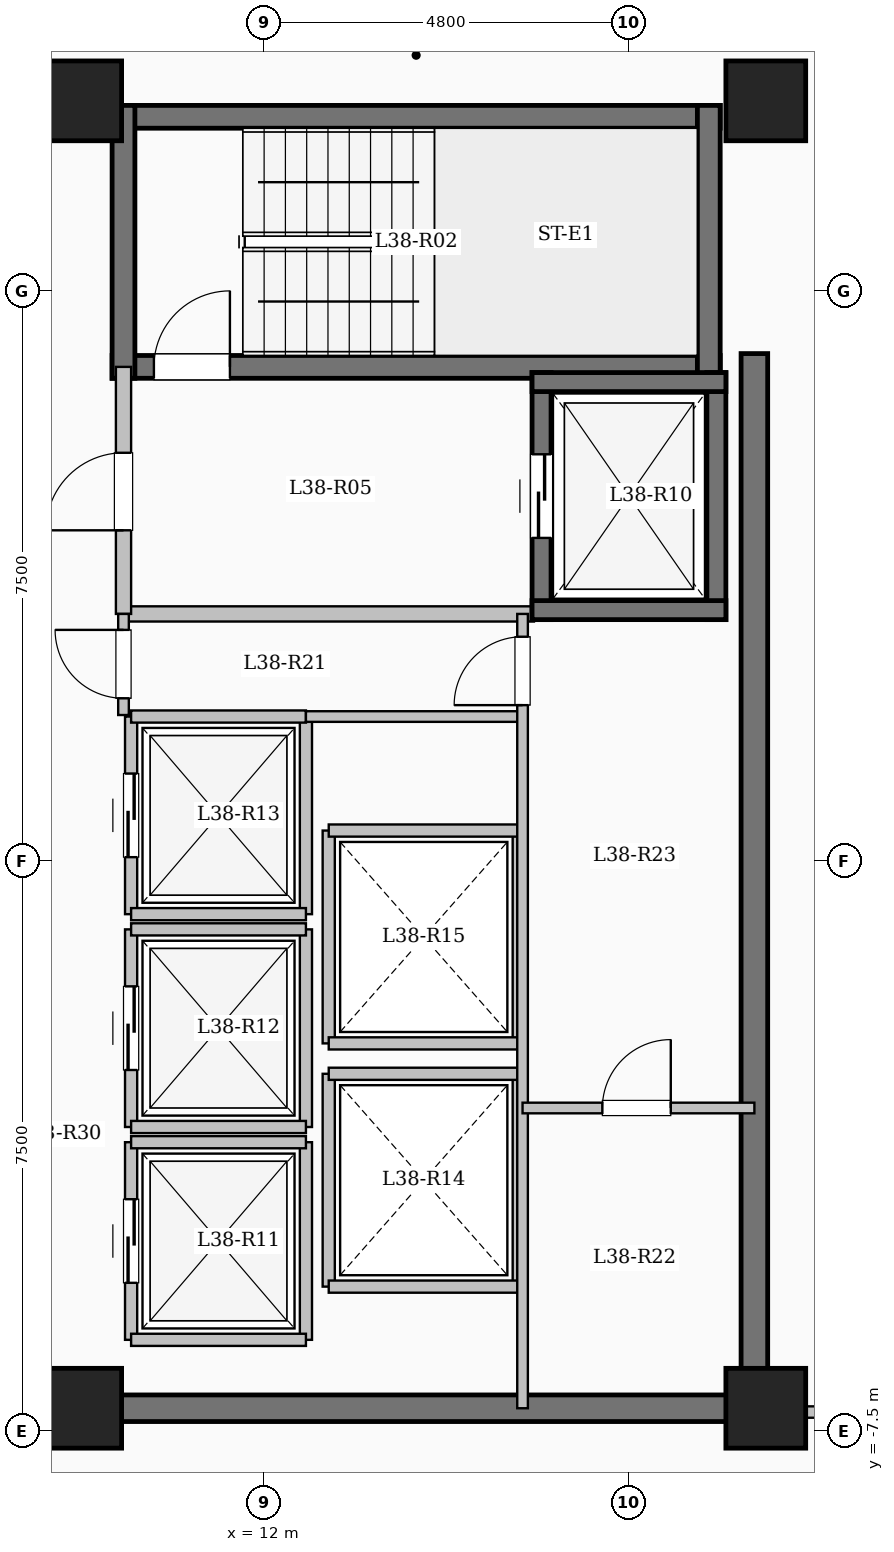
"""IFC4 building model, lengths in metres.
Left out: names, types, materials, properties, quantities, classifications, styles, units other than length and angle.
Written with IfcOpenShell. Run it as: python <this file> out.ifc"""

import sys

from ifc_helpers import new_model, si_unit, direction, frame, frame_2d, origin, origin_2d, place, context, subcontext, project, spatial, rectangle, extrude, element, fill, save


model = new_model("IFC4")
c1 = context("Model", 3, precision=1e-05, world=origin(), true_north=direction((0.0, 1.0)))
c2 = subcontext(c1, "Body", "Model", "MODEL_VIEW")
j1 = project(units=[si_unit("LENGTHUNIT", "METRE"), si_unit("PLANEANGLEUNIT", "RADIAN")], contexts=[c1])
p1 = place(None, origin())
s1 = spatial("IfcSite", under=j1, at=p1, CompositionType="ELEMENT")
p2 = place(p1, origin())
s2 = spatial("IfcBuilding", under=s1, at=p2, CompositionType="ELEMENT")
p3 = place(p2, frame((0.0, 0.0, 142.65)))
s3 = spatial("IfcBuildingStorey", under=s2, at=p3, CompositionType="ELEMENT", Elevation=142.65)
for number, where, z_axis, x_axis in (
    (1, (9.6, -7.2, 0.0), (0.0, 0.0, 1.0), (1.0, 0.0, 0.0)),
    (2, (9.6, 10.0, 0.0), (0.0, 0.0, 1.0), (1.0, 0.0, 0.0)),
    (3, (18.6, -7.2, 0.0), (0.0, 0.0, 1.0), (1.0, 0.0, 0.0)),
    (4, (18.6, 10.0, 0.0), (0.0, 0.0, 1.0), (1.0, 0.0, 0.0)),
):
    element("IfcColumn", number, at=place(p3, frame(where, z_axis=z_axis, x_axis=x_axis)), inside=s3, PredefinedType="COLUMN", context=c2, shape_type="SweptSolid", body=[
        extrude(rectangle(XDim=1.05, YDim=1.05, at=origin_2d()), origin(), (0.0, 0.0, 1.0), 3.35),
    ])
p4 = place(p3, frame((10.0, 9.79, 0.0), z_axis=(0.0, 0.0, 1.0), x_axis=(1.0, 0.0, 0.0)))
e5 = element("IfcWall", 5, at=p4, inside=s3, PredefinedType="SHEAR", context=c2, shape_type="SweptSolid", body=[
    extrude(rectangle(XDim=8.0, YDim=0.3, at=frame_2d((4.0, 0.0))), origin(), (0.0, 0.0, 1.0), 3.35),
])
p5 = place(p3, frame((10.0, 6.5, 0.0), z_axis=(0.0, 0.0, 1.0), x_axis=(1.0, 0.0, 0.0)))
e6 = element("IfcWall", 6, at=p5, inside=s3, PredefinedType="SHEAR", context=c2, shape_type="SweptSolid", body=[
    extrude(rectangle(XDim=8.0, YDim=0.3, at=frame_2d((4.0, 0.0))), origin(), (0.0, 0.0, 1.0), 3.35),
])
p6 = place(p5, frame((0.55, 0.0, 0.0)))
e7 = element("IfcOpeningElement", 7, at=p6, cuts=e6, PredefinedType="OPENING", context=c2, shape_type="SweptSolid", body=[
    extrude(rectangle(XDim=1.0, YDim=2.15, at=frame_2d((0.5, 1.075))), frame((0.0, 0.16, 0.0), z_axis=(0.0, -1.0, 0.0), x_axis=(1.0, 0.0, 0.0)), (0.0, 0.0, 1.0), 0.32),
])
for number, where, z_axis, x_axis in (
    (8, (10.15, 6.35, 0.0), (0.0, 0.0, 1.0), (0.0, 1.0, 0.0)),
    (9, (17.85, 6.35, 0.0), (0.0, 0.0, 1.0), (0.0, 1.0, 0.0)),
):
    element("IfcWall", number, at=place(p3, frame(where, z_axis=z_axis, x_axis=x_axis)), inside=s3, PredefinedType="SHEAR", context=c2, shape_type="SweptSolid", body=[
        extrude(rectangle(XDim=3.59, YDim=0.3, at=frame_2d((1.795, 0.0))), origin(), (0.0, 0.0, 1.0), 3.35),
    ])
p7 = place(p3, frame((10.15, 3.25, 0.0), z_axis=(0.0, 0.0, 1.0), x_axis=(1.0, 0.0, 0.0)))
e10 = element("IfcWall", 10, at=p7, inside=s3, PredefinedType="SOLIDWALL", context=c2, shape_type="SweptSolid", body=[
    extrude(rectangle(XDim=5.4, YDim=0.2, at=frame_2d((2.7, 0.0))), origin(), (0.0, 0.0, 1.0), 3.1),
])
p8 = place(p3, frame((10.15, 3.25, 0.0), z_axis=(0.0, 0.0, 1.0), x_axis=(0.0, 1.0, 0.0)))
e11 = element("IfcWall", 11, at=p8, inside=s3, PredefinedType="SOLIDWALL", context=c2, shape_type="SweptSolid", body=[
    extrude(rectangle(XDim=3.25, YDim=0.2, at=frame_2d((1.625, 0.0))), origin(), (0.0, 0.0, 1.0), 3.1),
])
p9 = place(p8, frame((1.1, 0.0, 0.0)))
e12 = element("IfcOpeningElement", 12, at=p9, cuts=e11, PredefinedType="OPENING", context=c2, shape_type="SweptSolid", body=[
    extrude(rectangle(XDim=1.02, YDim=2.15, at=frame_2d((0.51, 1.075))), frame((0.0, 0.11, 0.0), z_axis=(0.0, -1.0, 0.0), x_axis=(1.0, 0.0, 0.0)), (0.0, 0.0, 1.0), 0.22),
])
p10 = place(p3, frame((15.65, 3.175, 0.0), z_axis=(0.0, 0.0, 1.0), x_axis=(0.0, 1.0, 0.0)))
e13 = element("IfcWall", 13, at=p10, inside=s3, PredefinedType="SHEAR", context=c2, shape_type="SweptSolid", body=[
    extrude(rectangle(XDim=3.25, YDim=0.25, at=frame_2d((1.625, 0.0))), origin(), (0.0, 0.0, 1.0), 3.35),
])
p11 = place(p10, frame((1.075, 0.0, 0.0)))
e14 = element("IfcOpeningElement", 14, at=p11, cuts=e13, PredefinedType="OPENING", context=c2, shape_type="SweptSolid", body=[
    extrude(rectangle(XDim=1.1, YDim=2.15, at=frame_2d((0.55, 1.075))), frame((0.0, 0.135, 0.0), z_axis=(0.0, -1.0, 0.0), x_axis=(1.0, 0.0, 0.0)), (0.0, 0.0, 1.0), 0.27),
])
p12 = place(p3, frame((17.95, 3.175, 0.0), z_axis=(0.0, 0.0, 1.0), x_axis=(0.0, 1.0, 0.0)))
e15 = element("IfcWall", 15, at=p12, inside=s3, PredefinedType="SHEAR", context=c2, shape_type="SweptSolid", body=[
    extrude(rectangle(XDim=3.25, YDim=0.25, at=frame_2d((1.625, 0.0))), origin(), (0.0, 0.0, 1.0), 3.35),
])
for number, where, z_axis, x_axis in (
    (16, (15.525, 3.3, 0.0), (0.0, 0.0, 1.0), (1.0, 0.0, 0.0)),
    (17, (15.525, 6.3, 0.0), (0.0, 0.0, 1.0), (1.0, 0.0, 0.0)),
):
    element("IfcWall", number, at=place(p3, frame(where, z_axis=z_axis, x_axis=x_axis)), inside=s3, PredefinedType="SHEAR", context=c2, shape_type="SweptSolid", body=[
        extrude(rectangle(XDim=2.55, YDim=0.25, at=frame_2d((1.275, 0.0))), origin(), (0.0, 0.0, 1.0), 3.35),
    ])
p13 = place(p3, frame((10.25, -6.3, 0.0), z_axis=(0.0, 0.0, 1.0), x_axis=(0.0, 1.0, 0.0)))
e18 = element("IfcWall", 18, at=p13, inside=s3, PredefinedType="SOLIDWALL", context=c2, shape_type="SweptSolid", body=[
    extrude(rectangle(XDim=2.6, YDim=0.16, at=frame_2d((1.3, 0.0))), origin(), (0.0, 0.0, 1.0), 3.1),
])
p14 = place(p13, frame((0.75, 0.0, 0.0)))
e19 = element("IfcOpeningElement", 19, at=p14, cuts=e18, PredefinedType="OPENING", context=c2, shape_type="SweptSolid", body=[
    extrude(rectangle(XDim=1.1, YDim=2.15, at=frame_2d((0.55, 1.075))), frame((0.0, 0.09, 0.0), z_axis=(0.0, -1.0, 0.0), x_axis=(1.0, 0.0, 0.0)), (0.0, 0.0, 1.0), 0.18),
])
p15 = place(p3, frame((12.55, -6.3, 0.0), z_axis=(0.0, 0.0, 1.0), x_axis=(0.0, 1.0, 0.0)))
e20 = element("IfcWall", 20, at=p15, inside=s3, PredefinedType="SOLIDWALL", context=c2, shape_type="SweptSolid", body=[
    extrude(rectangle(XDim=2.6, YDim=0.16, at=frame_2d((1.3, 0.0))), origin(), (0.0, 0.0, 1.0), 3.1),
])
for number, where, z_axis, x_axis in (
    (21, (10.25, -6.3, 0.0), (0.0, 0.0, 1.0), (1.0, 0.0, 0.0)),
    (22, (10.25, -3.7, 0.0), (0.0, 0.0, 1.0), (1.0, 0.0, 0.0)),
):
    element("IfcWall", number, at=place(p3, frame(where, z_axis=z_axis, x_axis=x_axis)), inside=s3, PredefinedType="SOLIDWALL", context=c2, shape_type="SweptSolid", body=[
        extrude(rectangle(XDim=2.3, YDim=0.16, at=frame_2d((1.15, 0.0))), origin(), (0.0, 0.0, 1.0), 3.1),
    ])
p16 = place(p3, frame((10.25, -3.5, 0.0), z_axis=(0.0, 0.0, 1.0), x_axis=(0.0, 1.0, 0.0)))
e23 = element("IfcWall", 23, at=p16, inside=s3, PredefinedType="SOLIDWALL", context=c2, shape_type="SweptSolid", body=[
    extrude(rectangle(XDim=2.6, YDim=0.16, at=frame_2d((1.3, 0.0))), origin(), (0.0, 0.0, 1.0), 3.1),
])
p17 = place(p16, frame((0.75, 0.0, 0.0)))
e24 = element("IfcOpeningElement", 24, at=p17, cuts=e23, PredefinedType="OPENING", context=c2, shape_type="SweptSolid", body=[
    extrude(rectangle(XDim=1.1, YDim=2.15, at=frame_2d((0.55, 1.075))), frame((0.0, 0.09, 0.0), z_axis=(0.0, -1.0, 0.0), x_axis=(1.0, 0.0, 0.0)), (0.0, 0.0, 1.0), 0.18),
])
p18 = place(p3, frame((12.55, -3.5, 0.0), z_axis=(0.0, 0.0, 1.0), x_axis=(0.0, 1.0, 0.0)))
e25 = element("IfcWall", 25, at=p18, inside=s3, PredefinedType="SOLIDWALL", context=c2, shape_type="SweptSolid", body=[
    extrude(rectangle(XDim=2.6, YDim=0.16, at=frame_2d((1.3, 0.0))), origin(), (0.0, 0.0, 1.0), 3.1),
])
for number, where, z_axis, x_axis in (
    (26, (10.25, -3.5, 0.0), (0.0, 0.0, 1.0), (1.0, 0.0, 0.0)),
    (27, (10.25, -0.9, 0.0), (0.0, 0.0, 1.0), (1.0, 0.0, 0.0)),
):
    element("IfcWall", number, at=place(p3, frame(where, z_axis=z_axis, x_axis=x_axis)), inside=s3, PredefinedType="SOLIDWALL", context=c2, shape_type="SweptSolid", body=[
        extrude(rectangle(XDim=2.3, YDim=0.16, at=frame_2d((1.15, 0.0))), origin(), (0.0, 0.0, 1.0), 3.1),
    ])
p19 = place(p3, frame((10.25, -0.7, 0.0), z_axis=(0.0, 0.0, 1.0), x_axis=(0.0, 1.0, 0.0)))
e28 = element("IfcWall", 28, at=p19, inside=s3, PredefinedType="SOLIDWALL", context=c2, shape_type="SweptSolid", body=[
    extrude(rectangle(XDim=2.6, YDim=0.16, at=frame_2d((1.3, 0.0))), origin(), (0.0, 0.0, 1.0), 3.1),
])
p20 = place(p19, frame((0.75, 0.0, 0.0)))
e29 = element("IfcOpeningElement", 29, at=p20, cuts=e28, PredefinedType="OPENING", context=c2, shape_type="SweptSolid", body=[
    extrude(rectangle(XDim=1.1, YDim=2.15, at=frame_2d((0.55, 1.075))), frame((0.0, 0.09, 0.0), z_axis=(0.0, -1.0, 0.0), x_axis=(1.0, 0.0, 0.0)), (0.0, 0.0, 1.0), 0.18),
])
p21 = place(p3, frame((12.55, -0.7, 0.0), z_axis=(0.0, 0.0, 1.0), x_axis=(0.0, 1.0, 0.0)))
e30 = element("IfcWall", 30, at=p21, inside=s3, PredefinedType="SOLIDWALL", context=c2, shape_type="SweptSolid", body=[
    extrude(rectangle(XDim=2.6, YDim=0.16, at=frame_2d((1.3, 0.0))), origin(), (0.0, 0.0, 1.0), 3.1),
])
for number, where, z_axis, x_axis in (
    (31, (10.25, -0.7, 0.0), (0.0, 0.0, 1.0), (1.0, 0.0, 0.0)),
    (32, (10.25, 1.9, 0.0), (0.0, 0.0, 1.0), (1.0, 0.0, 0.0)),
):
    element("IfcWall", number, at=place(p3, frame(where, z_axis=z_axis, x_axis=x_axis)), inside=s3, PredefinedType="SOLIDWALL", context=c2, shape_type="SweptSolid", body=[
        extrude(rectangle(XDim=2.3, YDim=0.16, at=frame_2d((1.15, 0.0))), origin(), (0.0, 0.0, 1.0), 3.1),
    ])
for number, where, z_axis, x_axis in (
    (33, (12.85, -5.6, 0.0), (0.0, 0.0, 1.0), (0.0, 1.0, 0.0)),
    (34, (15.35, -5.6, 0.0), (0.0, 0.0, 1.0), (0.0, 1.0, 0.0)),
):
    element("IfcWall", number, at=place(p3, frame(where, z_axis=z_axis, x_axis=x_axis)), inside=s3, PredefinedType="SOLIDWALL", context=c2, shape_type="SweptSolid", body=[
        extrude(rectangle(XDim=2.8, YDim=0.16, at=frame_2d((1.4, 0.0))), origin(), (0.0, 0.0, 1.0), 3.1),
    ])
for number, where, z_axis, x_axis in (
    (35, (12.85, -5.6, 0.0), (0.0, 0.0, 1.0), (1.0, 0.0, 0.0)),
    (36, (12.85, -2.8, 0.0), (0.0, 0.0, 1.0), (1.0, 0.0, 0.0)),
):
    element("IfcWall", number, at=place(p3, frame(where, z_axis=z_axis, x_axis=x_axis)), inside=s3, PredefinedType="SOLIDWALL", context=c2, shape_type="SweptSolid", body=[
        extrude(rectangle(XDim=2.5, YDim=0.16, at=frame_2d((1.25, 0.0))), origin(), (0.0, 0.0, 1.0), 3.1),
    ])
for number, where, z_axis, x_axis in (
    (37, (12.85, -2.4, 0.0), (0.0, 0.0, 1.0), (0.0, 1.0, 0.0)),
    (38, (15.35, -2.4, 0.0), (0.0, 0.0, 1.0), (0.0, 1.0, 0.0)),
):
    element("IfcWall", number, at=place(p3, frame(where, z_axis=z_axis, x_axis=x_axis)), inside=s3, PredefinedType="SOLIDWALL", context=c2, shape_type="SweptSolid", body=[
        extrude(rectangle(XDim=2.8, YDim=0.16, at=frame_2d((1.4, 0.0))), origin(), (0.0, 0.0, 1.0), 3.1),
    ])
for number, where, z_axis, x_axis in (
    (39, (12.85, -2.4, 0.0), (0.0, 0.0, 1.0), (1.0, 0.0, 0.0)),
    (40, (12.85, 0.4, 0.0), (0.0, 0.0, 1.0), (1.0, 0.0, 0.0)),
):
    element("IfcWall", number, at=place(p3, frame(where, z_axis=z_axis, x_axis=x_axis)), inside=s3, PredefinedType="SOLIDWALL", context=c2, shape_type="SweptSolid", body=[
        extrude(rectangle(XDim=2.5, YDim=0.16, at=frame_2d((1.25, 0.0))), origin(), (0.0, 0.0, 1.0), 3.1),
    ])
p22 = place(p3, frame((18.45, -7.375, 0.0), z_axis=(0.0, 0.0, 1.0), x_axis=(0.0, 1.0, 0.0)))
e41 = element("IfcWall", 41, at=p22, inside=s3, PredefinedType="SHEAR", context=c2, shape_type="SweptSolid", body=[
    extrude(rectangle(XDim=14.05, YDim=0.35, at=frame_2d((7.025, 0.0))), origin(), (0.0, 0.0, 1.0), 3.35),
])
p23 = place(p3, frame((10.075, -7.2, 0.0), z_axis=(0.0, 0.0, 1.0), x_axis=(1.0, 0.0, 0.0)))
e42 = element("IfcWall", 42, at=p23, inside=s3, PredefinedType="SHEAR", context=c2, shape_type="SweptSolid", body=[
    extrude(rectangle(XDim=8.55, YDim=0.35, at=frame_2d((4.275, 0.0))), origin(), (0.0, 0.0, 1.0), 3.35),
])
p24 = place(p3, frame((12.55, 1.9, 0.0), z_axis=(0.0, 0.0, 1.0), x_axis=(1.0, 0.0, 0.0)))
e43 = element("IfcWall", 43, at=p24, inside=s3, PredefinedType="PARTITIONING", context=c2, shape_type="SweptSolid", body=[
    extrude(rectangle(XDim=2.85, YDim=0.14, at=frame_2d((1.425, 0.0))), origin(), (0.0, 0.0, 1.0), 3.1),
])
p25 = place(p3, frame((10.15, 1.92, 0.0), z_axis=(0.0, 0.0, 1.0), x_axis=(0.0, 1.0, 0.0)))
e44 = element("IfcWall", 44, at=p25, inside=s3, PredefinedType="PARTITIONING", context=c2, shape_type="SweptSolid", body=[
    extrude(rectangle(XDim=1.33, YDim=0.14, at=frame_2d((0.665, 0.0))), origin(), (0.0, 0.0, 1.0), 3.1),
])
p26 = place(p25, frame((0.22, 0.0, 0.0)))
e45 = element("IfcOpeningElement", 45, at=p26, cuts=e44, PredefinedType="OPENING", context=c2, shape_type="SweptSolid", body=[
    extrude(rectangle(XDim=0.9, YDim=2.08, at=frame_2d((0.45, 1.04))), frame((0.0, 0.08, 0.0), z_axis=(0.0, -1.0, 0.0), x_axis=(1.0, 0.0, 0.0)), (0.0, 0.0, 1.0), 0.16),
])
p27 = place(p3, frame((15.4, -7.2, 0.0), z_axis=(0.0, 0.0, 1.0), x_axis=(0.0, 1.0, 0.0)))
e46 = element("IfcWall", 46, at=p27, inside=s3, PredefinedType="PARTITIONING", context=c2, shape_type="SweptSolid", body=[
    extrude(rectangle(XDim=10.45, YDim=0.14, at=frame_2d((5.225, 0.0))), origin(), (0.0, 0.0, 1.0), 3.1),
])
p28 = place(p27, frame((9.25, 0.0, 0.0)))
e47 = element("IfcOpeningElement", 47, at=p28, cuts=e46, PredefinedType="OPENING", context=c2, shape_type="SweptSolid", body=[
    extrude(rectangle(XDim=0.9, YDim=2.08, at=frame_2d((0.45, 1.04))), frame((0.0, 0.08, 0.0), z_axis=(0.0, -1.0, 0.0), x_axis=(1.0, 0.0, 0.0)), (0.0, 0.0, 1.0), 0.16),
])
p29 = place(p3, frame((15.4, -3.25, 0.0), z_axis=(0.0, 0.0, 1.0), x_axis=(1.0, 0.0, 0.0)))
e48 = element("IfcWall", 48, at=p29, inside=s3, PredefinedType="PARTITIONING", context=c2, shape_type="SweptSolid", body=[
    extrude(rectangle(XDim=3.05, YDim=0.14, at=frame_2d((1.525, 0.0))), origin(), (0.0, 0.0, 1.0), 3.1),
])
p30 = place(p29, frame((1.05, 0.0, 0.0)))
e49 = element("IfcOpeningElement", 49, at=p30, cuts=e48, PredefinedType="OPENING", context=c2, shape_type="SweptSolid", body=[
    extrude(rectangle(XDim=0.9, YDim=2.08, at=frame_2d((0.45, 1.04))), frame((0.0, 0.08, 0.0), z_axis=(0.0, -1.0, 0.0), x_axis=(1.0, 0.0, 0.0)), (0.0, 0.0, 1.0), 0.16),
])
p31 = place(p3, frame((18.45, -7.25, 0.0), z_axis=(0.0, 0.0, 1.0), x_axis=(1.0, 0.0, 0.0)))
e50 = element("IfcWall", 50, at=p31, inside=s3, PredefinedType="PARTITIONING", context=c2, shape_type="SweptSolid", body=[
    extrude(rectangle(XDim=6.63, YDim=0.15, at=frame_2d((3.315, 0.0))), origin(), (0.0, 0.0, 1.0), 3.1),
])
p32 = place(p31, frame((1.95, 0.0, 0.0)))
e51 = element("IfcOpeningElement", 51, at=p32, cuts=e50, PredefinedType="OPENING", context=c2, shape_type="SweptSolid", body=[
    extrude(rectangle(XDim=1.08, YDim=2.15, at=frame_2d((0.54, 1.075))), frame((0.0, 0.085, 0.0), z_axis=(0.0, -1.0, 0.0), x_axis=(1.0, 0.0, 0.0)), (0.0, 0.0, 1.0), 0.17),
])
p33 = place(p6, origin())
e52 = element("IfcDoor", 52, at=p33, inside=s3, OperationType="SINGLE_SWING_RIGHT", PredefinedType="DOOR", context=c2, shape_type="SweptSolid", body=[
    extrude(rectangle(XDim=1.0, YDim=2.15, at=frame_2d((0.5, 1.075))), frame((0.0, 0.025, 0.0), z_axis=(0.0, -1.0, 0.0), x_axis=(1.0, 0.0, 0.0)), (0.0, 0.0, 1.0), 0.05),
])
fill(e7, e52)
p34 = place(p9, origin())
e53 = element("IfcDoor", 53, at=p34, inside=s3, OperationType="SINGLE_SWING_LEFT", PredefinedType="DOOR", context=c2, shape_type="SweptSolid", body=[
    extrude(rectangle(XDim=1.02, YDim=2.15, at=frame_2d((0.51, 1.075))), frame((0.0, 0.025, 0.0), z_axis=(0.0, -1.0, 0.0), x_axis=(1.0, 0.0, 0.0)), (0.0, 0.0, 1.0), 0.05),
])
fill(e12, e53)
p35 = place(p11, origin())
e54 = element("IfcDoor", 54, at=p35, inside=s3, OperationType="SLIDING_TO_LEFT", PredefinedType="DOOR", context=c2, shape_type="SweptSolid", body=[
    extrude(rectangle(XDim=1.1, YDim=2.15, at=frame_2d((0.55, 1.075))), frame((0.0, 0.025, 0.0), z_axis=(0.0, -1.0, 0.0), x_axis=(1.0, 0.0, 0.0)), (0.0, 0.0, 1.0), 0.05),
])
fill(e14, e54)
p36 = place(p14, origin())
e55 = element("IfcDoor", 55, at=p36, inside=s3, OperationType="SLIDING_TO_LEFT", PredefinedType="DOOR", context=c2, shape_type="SweptSolid", body=[
    extrude(rectangle(XDim=1.1, YDim=2.15, at=frame_2d((0.55, 1.075))), frame((0.0, 0.025, 0.0), z_axis=(0.0, -1.0, 0.0), x_axis=(1.0, 0.0, 0.0)), (0.0, 0.0, 1.0), 0.05),
])
fill(e19, e55)
p37 = place(p17, origin())
e56 = element("IfcDoor", 56, at=p37, inside=s3, OperationType="SLIDING_TO_LEFT", PredefinedType="DOOR", context=c2, shape_type="SweptSolid", body=[
    extrude(rectangle(XDim=1.1, YDim=2.15, at=frame_2d((0.55, 1.075))), frame((0.0, 0.025, 0.0), z_axis=(0.0, -1.0, 0.0), x_axis=(1.0, 0.0, 0.0)), (0.0, 0.0, 1.0), 0.05),
])
fill(e24, e56)
p38 = place(p20, origin())
e57 = element("IfcDoor", 57, at=p38, inside=s3, OperationType="SLIDING_TO_LEFT", PredefinedType="DOOR", context=c2, shape_type="SweptSolid", body=[
    extrude(rectangle(XDim=1.1, YDim=2.15, at=frame_2d((0.55, 1.075))), frame((0.0, 0.025, 0.0), z_axis=(0.0, -1.0, 0.0), x_axis=(1.0, 0.0, 0.0)), (0.0, 0.0, 1.0), 0.05),
])
fill(e29, e57)
p39 = place(p26, origin())
e58 = element("IfcDoor", 58, at=p39, inside=s3, OperationType="SINGLE_SWING_RIGHT", PredefinedType="DOOR", context=c2, shape_type="SweptSolid", body=[
    extrude(rectangle(XDim=0.9, YDim=2.08, at=frame_2d((0.45, 1.04))), frame((0.0, 0.025, 0.0), z_axis=(0.0, -1.0, 0.0), x_axis=(1.0, 0.0, 0.0)), (0.0, 0.0, 1.0), 0.05),
])
fill(e45, e58)
p40 = place(p28, origin())
e59 = element("IfcDoor", 59, at=p40, inside=s3, OperationType="SINGLE_SWING_LEFT", PredefinedType="DOOR", context=c2, shape_type="SweptSolid", body=[
    extrude(rectangle(XDim=0.9, YDim=2.08, at=frame_2d((0.45, 1.04))), frame((0.0, 0.025, 0.0), z_axis=(0.0, -1.0, 0.0), x_axis=(1.0, 0.0, 0.0)), (0.0, 0.0, 1.0), 0.05),
])
fill(e47, e59)
p41 = place(p30, origin())
e60 = element("IfcDoor", 60, at=p41, inside=s3, OperationType="SINGLE_SWING_RIGHT", PredefinedType="DOOR", context=c2, shape_type="SweptSolid", body=[
    extrude(rectangle(XDim=0.9, YDim=2.08, at=frame_2d((0.45, 1.04))), frame((0.0, 0.025, 0.0), z_axis=(0.0, -1.0, 0.0), x_axis=(1.0, 0.0, 0.0)), (0.0, 0.0, 1.0), 0.05),
])
fill(e49, e60)
save(model, sys.argv[1])
